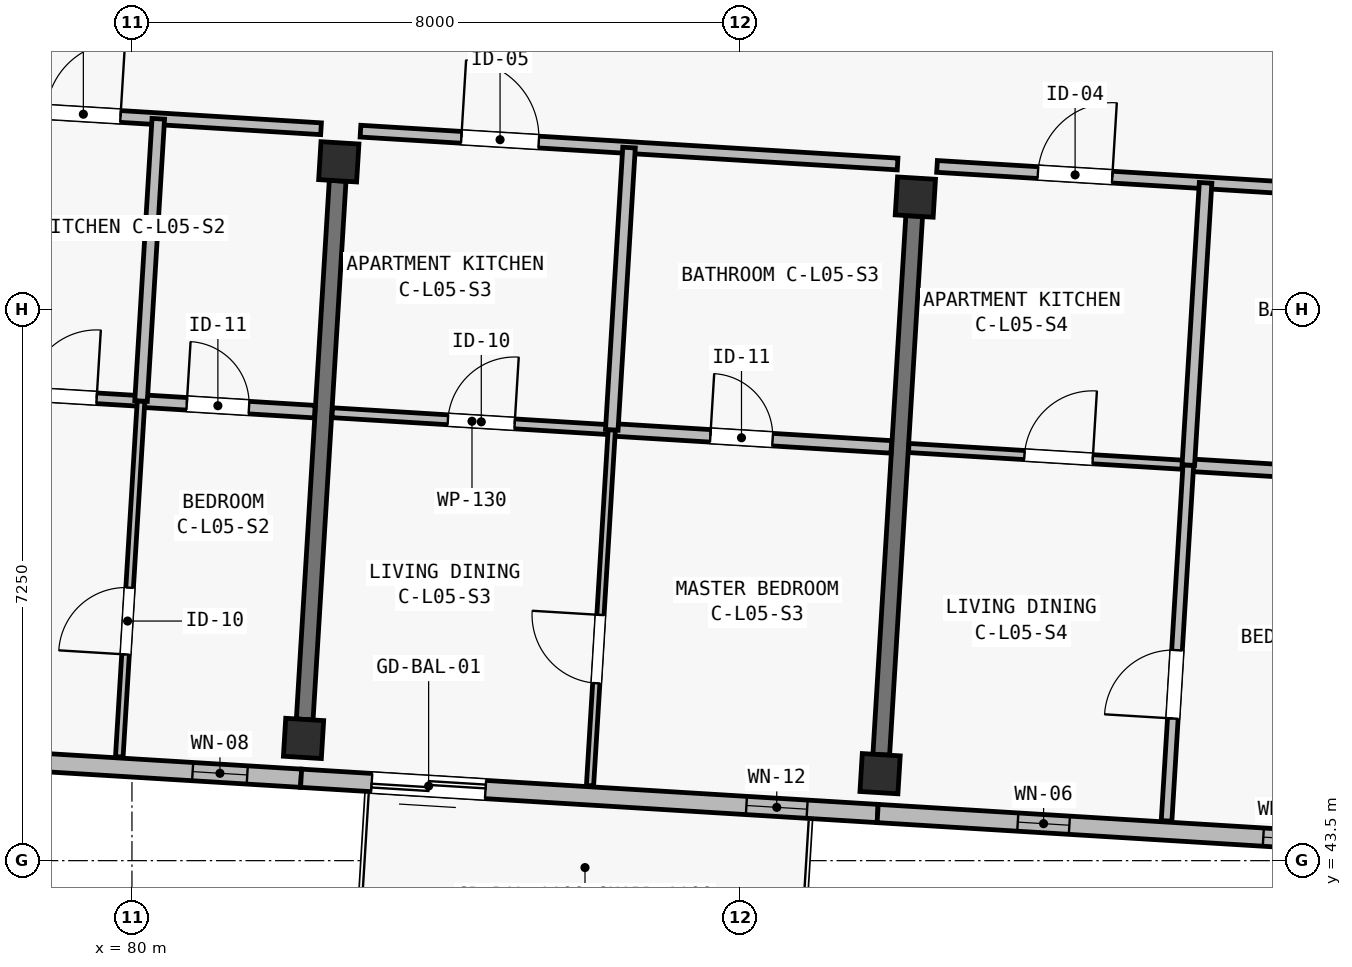
"""IFC4 building model, lengths in metres.
Left out: names, types, materials, properties, quantities, classifications, styles, units other than length and angle.
Written with IfcOpenShell. Run it as: python <this file> out.ifc"""

import sys

from ifc_helpers import new_model, si_unit, direction, frame, frame_2d, origin, origin_2d, place, context, subcontext, project, spatial, rectangle, extrude, element, fill, save


model = new_model("IFC4")
c1 = context("Model", 3, precision=1e-05, world=origin(), true_north=direction((0.0, 1.0)))
c2 = subcontext(c1, "Body", "Model", "MODEL_VIEW")
j1 = project(units=[si_unit("LENGTHUNIT", "METRE"), si_unit("PLANEANGLEUNIT", "RADIAN")], contexts=[c1])
p1 = place(None, origin())
s1 = spatial("IfcSite", under=j1, at=p1, CompositionType="ELEMENT")
p2 = place(p1, origin())
s2 = spatial("IfcBuilding", under=s1, at=p2, CompositionType="ELEMENT")
p3 = place(p2, frame((0.0, 0.0, 18.15)))
s3 = spatial("IfcBuildingStorey", under=s2, at=p3, CompositionType="ELEMENT", Elevation=18.15)
for number, where, z_axis, x_axis in (
    (1, (82.258, 45.108, 0.0), (0.0, 0.0, 1.0), (0.998, -0.061, 0.0)),
    (2, (82.721, 52.694, 0.0), (0.0, 0.0, 1.0), (0.998, -0.061, 0.0)),
    (3, (89.843, 44.644, 0.0), (0.0, 0.0, 1.0), (0.998, -0.061, 0.0)),
    (4, (90.307, 52.23, 0.0), (0.0, 0.0, 1.0), (0.998, -0.061, 0.0)),
):
    element("IfcColumn", number, at=place(p3, frame(where, z_axis=z_axis, x_axis=x_axis)), inside=s3, PredefinedType="COLUMN", context=c2, shape_type="SweptSolid", body=[
        extrude(rectangle(XDim=0.5, YDim=0.5, at=origin_2d()), origin(), (0.0, 0.0, 1.0), 3.25),
    ])
p4 = place(p3, frame((82.273, 45.358, 0.0), z_axis=(0.0, 0.0, 1.0), x_axis=(0.061070212127, 0.998133472633, 0.0)))
e5 = element("IfcWall", 5, at=p4, inside=s3, PredefinedType="SHEAR", context=c2, shape_type="SweptSolid", body=[
    extrude(rectangle(XDim=7.1, YDim=0.22, at=frame_2d((3.55, 0.0))), origin(), (0.0, 0.0, 1.0), 2.5),
])
p5 = place(p3, frame((89.859, 44.894, 0.0), z_axis=(0.0, 0.0, 1.0), x_axis=(0.061033859059, 0.99813569621, 0.0)))
e6 = element("IfcWall", 6, at=p5, inside=s3, PredefinedType="SHEAR", context=c2, shape_type="SweptSolid", body=[
    extrude(rectangle(XDim=7.1, YDim=0.22, at=frame_2d((3.55, 0.0))), origin(), (0.0, 0.0, 1.0), 2.5),
])
p6 = place(p3, frame((82.225, 44.584, 0.0), z_axis=(0.0, 0.0, 1.0), x_axis=(-0.998133591969, 0.061068261669, 0.0)))
e7 = element("IfcWall", 7, at=p6, inside=s3, PredefinedType="SOLIDWALL", context=c2, shape_type="SweptSolid", body=[
    extrude(rectangle(XDim=7.6, YDim=0.24, at=frame_2d((3.8, 0.0))), origin(), (0.0, 0.0, 1.0), 3.0),
])
p7 = place(p6, frame((0.71, 0.0, 0.48)))
e8 = element("IfcOpeningElement", 8, at=p7, cuts=e7, PredefinedType="OPENING", context=c2, shape_type="SweptSolid", body=[
    extrude(rectangle(XDim=0.72, YDim=2.16, at=frame_2d((0.36, 1.08))), frame((0.0, 0.135, 0.0), z_axis=(0.0, -1.0, 0.0), x_axis=(1.0, 0.0, 0.0)), (0.0, 0.0, 1.0), 0.27),
])
p8 = place(p6, frame((3.504, 0.0, 0.48)))
e9 = element("IfcOpeningElement", 9, at=p8, cuts=e7, PredefinedType="OPENING", context=c2, shape_type="SweptSolid", body=[
    extrude(rectangle(XDim=0.78, YDim=2.2, at=frame_2d((0.39, 1.1))), frame((0.0, 0.135, 0.0), z_axis=(0.0, -1.0, 0.0), x_axis=(1.0, 0.0, 0.0)), (0.0, 0.0, 1.0), 0.27),
])
p9 = place(p3, frame((89.811, 44.12, 0.0), z_axis=(0.0, 0.0, 1.0), x_axis=(-0.998135669243, 0.061034300063, 0.0)))
e10 = element("IfcWall", 10, at=p9, inside=s3, PredefinedType="SOLIDWALL", context=c2, shape_type="SweptSolid", body=[
    extrude(rectangle(XDim=7.6, YDim=0.24, at=frame_2d((3.8, 0.0))), origin(), (0.0, 0.0, 1.0), 3.0),
])
p10 = place(p9, frame((5.169, 0.0, 0.0)))
e11 = element("IfcOpeningElement", 11, at=p10, cuts=e10, PredefinedType="OPENING", context=c2, shape_type="SweptSolid", body=[
    extrude(rectangle(XDim=1.5, YDim=2.12, at=frame_2d((0.75, 1.06))), frame((0.0, 0.135, 0.0), z_axis=(0.0, -1.0, 0.0), x_axis=(1.0, 0.0, 0.0)), (0.0, 0.0, 1.0), 0.27),
])
p11 = place(p9, frame((0.93, 0.0, 0.5)))
e12 = element("IfcOpeningElement", 12, at=p11, cuts=e10, PredefinedType="OPENING", context=c2, shape_type="SweptSolid", body=[
    extrude(rectangle(XDim=0.8, YDim=2.3, at=frame_2d((0.4, 1.15))), frame((0.0, 0.135, 0.0), z_axis=(0.0, -1.0, 0.0), x_axis=(1.0, 0.0, 0.0)), (0.0, 0.0, 1.0), 0.27),
])
p12 = place(p3, frame((97.397, 43.656, 0.0), z_axis=(0.0, 0.0, 1.0), x_axis=(-0.998135549572, 0.061036257095, 0.0)))
e13 = element("IfcWall", 13, at=p12, inside=s3, PredefinedType="SOLIDWALL", context=c2, shape_type="SweptSolid", body=[
    extrude(rectangle(XDim=7.6, YDim=0.24, at=frame_2d((3.8, 0.0))), origin(), (0.0, 0.0, 1.0), 3.0),
])
p13 = place(p12, frame((1.896, 0.0, 0.42)))
e14 = element("IfcOpeningElement", 14, at=p13, cuts=e13, PredefinedType="OPENING", context=c2, shape_type="SweptSolid", body=[
    extrude(rectangle(XDim=0.62, YDim=2.28, at=frame_2d((0.31, 1.14))), frame((0.0, 0.135, 0.0), z_axis=(0.0, -1.0, 0.0), x_axis=(1.0, 0.0, 0.0)), (0.0, 0.0, 1.0), 0.27),
])
p14 = place(p12, frame((5.073, 0.0, 0.42)))
e15 = element("IfcOpeningElement", 15, at=p14, cuts=e13, PredefinedType="OPENING", context=c2, shape_type="SweptSolid", body=[
    extrude(rectangle(XDim=0.68, YDim=2.24, at=frame_2d((0.34, 1.12))), frame((0.0, 0.135, 0.0), z_axis=(0.0, -1.0, 0.0), x_axis=(1.0, 0.0, 0.0)), (0.0, 0.0, 1.0), 0.27),
])
p15 = place(p3, frame((78.415, 53.378, 0.0), z_axis=(0.0, 0.0, 1.0), x_axis=(0.998131852862, -0.061096679962, 0.0)))
e16 = element("IfcWall", 16, at=p15, inside=s3, PredefinedType="PARTITIONING", context=c2, shape_type="SweptSolid", body=[
    extrude(rectangle(XDim=4.08, YDim=0.155, at=frame_2d((2.04, 0.0))), origin(), (0.0, 0.0, 1.0), 2.97),
])
p16 = place(p15, frame((0.457, 0.0, 0.0)))
e17 = element("IfcOpeningElement", 17, at=p16, cuts=e16, PredefinedType="OPENING", context=c2, shape_type="SweptSolid", body=[
    extrude(rectangle(XDim=0.98, YDim=2.15, at=frame_2d((0.49, 1.075))), frame((0.0, 0.093, 0.0), z_axis=(0.0, -1.0, 0.0), x_axis=(1.0, 0.0, 0.0)), (0.0, 0.0, 1.0), 0.185),
])
p17 = place(p3, frame((75.049, 49.857, 0.0), z_axis=(0.0, 0.0, 1.0), x_axis=(0.998135637207, -0.061034823981, 0.0)))
e18 = element("IfcWall", 18, at=p17, inside=s3, PredefinedType="PARTITIONING", context=c2, shape_type="SweptSolid", body=[
    extrude(rectangle(XDim=5.08, YDim=0.14, at=frame_2d((2.54, 0.0))), origin(), (0.0, 0.0, 1.0), 2.97),
])
p18 = place(p17, frame((3.595, 0.0, 0.0)))
e19 = element("IfcOpeningElement", 19, at=p18, cuts=e18, PredefinedType="OPENING", context=c2, shape_type="SweptSolid", body=[
    extrude(rectangle(XDim=0.9, YDim=2.1, at=frame_2d((0.45, 1.05))), frame((0.0, 0.085, 0.0), z_axis=(0.0, -1.0, 0.0), x_axis=(1.0, 0.0, 0.0)), (0.0, 0.0, 1.0), 0.17),
])
p19 = place(p3, frame((80.119, 49.547, 0.0), z_axis=(0.0, 0.0, 1.0), x_axis=(0.99813262565, -0.061084053668, 0.0)))
e20 = element("IfcWall", 20, at=p19, inside=s3, PredefinedType="PLUMBINGWALL", context=c2, shape_type="SweptSolid", body=[
    extrude(rectangle(XDim=2.29, YDim=0.165, at=frame_2d((1.145, 0.0))), origin(), (0.0, 0.0, 1.0), 2.97),
])
p20 = place(p19, frame((0.603, 0.0, 0.0)))
e21 = element("IfcOpeningElement", 21, at=p20, cuts=e20, PredefinedType="OPENING", context=c2, shape_type="SweptSolid", body=[
    extrude(rectangle(XDim=0.82, YDim=2.08, at=frame_2d((0.41, 1.04))), frame((0.0, 0.097, 0.0), z_axis=(0.0, -1.0, 0.0), x_axis=(1.0, 0.0, 0.0)), (0.0, 0.0, 1.0), 0.195),
])
p21 = place(p3, frame((79.833, 44.866, 0.0), z_axis=(0.0, 0.0, 1.0), x_axis=(0.061010571843, 0.998137119901, 0.0)))
e22 = element("IfcWall", 22, at=p21, inside=s3, PredefinedType="PARTITIONING", context=c2, shape_type="SweptSolid", body=[
    extrude(rectangle(XDim=4.69, YDim=0.1, at=frame_2d((2.345, 0.0))), origin(), (0.0, 0.0, 1.0), 2.97),
])
p22 = place(p21, frame((1.35, 0.0, 0.0)))
e23 = element("IfcOpeningElement", 23, at=p22, cuts=e22, PredefinedType="OPENING", context=c2, shape_type="SweptSolid", body=[
    extrude(rectangle(XDim=0.88, YDim=2.1, at=frame_2d((0.44, 1.05))), frame((0.0, 0.065, 0.0), z_axis=(0.0, -1.0, 0.0), x_axis=(1.0, 0.0, 0.0)), (0.0, 0.0, 1.0), 0.13),
])
p23 = place(p3, frame((80.119, 49.547, 0.0), z_axis=(0.0, 0.0, 1.0), x_axis=(0.061099388563, 0.998131687062, 0.0)))
e24 = element("IfcWall", 24, at=p23, inside=s3, PredefinedType="PLUMBINGWALL", context=c2, shape_type="SweptSolid", body=[
    extrude(rectangle(XDim=3.72, YDim=0.165, at=frame_2d((1.86, 0.0))), origin(), (0.0, 0.0, 1.0), 2.97),
])
p24 = place(p3, frame((83.007, 53.097, 0.0), z_axis=(0.0, 0.0, 1.0), x_axis=(0.998135666539, -0.061034344288, 0.0)))
e25 = element("IfcWall", 25, at=p24, inside=s3, PredefinedType="PARTITIONING", context=c2, shape_type="SweptSolid", body=[
    extrude(rectangle(XDim=7.08, YDim=0.155, at=frame_2d((3.54, 0.0))), origin(), (0.0, 0.0, 1.0), 2.97),
])
p25 = place(p24, frame((1.33, 0.0, 0.0)))
e26 = element("IfcOpeningElement", 26, at=p25, cuts=e25, PredefinedType="OPENING", context=c2, shape_type="SweptSolid", body=[
    extrude(rectangle(XDim=1.02, YDim=2.2, at=frame_2d((0.51, 1.1))), frame((0.0, 0.093, 0.0), z_axis=(0.0, -1.0, 0.0), x_axis=(1.0, 0.0, 0.0)), (0.0, 0.0, 1.0), 0.185),
])
p26 = place(p3, frame((82.635, 49.393, 0.0), z_axis=(0.0, 0.0, 1.0), x_axis=(0.998132682596, -0.061083123148, 0.0)))
e27 = element("IfcWall", 27, at=p26, inside=s3, PredefinedType="PARTITIONING", context=c2, shape_type="SweptSolid", body=[
    extrude(rectangle(XDim=3.685, YDim=0.13, at=frame_2d((1.843, 0.0))), origin(), (0.0, 0.0, 1.0), 2.97),
])
p27 = place(p26, frame((1.525, 0.0, 0.0)))
e28 = element("IfcOpeningElement", 28, at=p27, cuts=e27, PredefinedType="OPENING", context=c2, shape_type="SweptSolid", body=[
    extrude(rectangle(XDim=0.88, YDim=2.1, at=frame_2d((0.44, 1.05))), frame((0.0, 0.08, 0.0), z_axis=(0.0, -1.0, 0.0), x_axis=(1.0, 0.0, 0.0)), (0.0, 0.0, 1.0), 0.16),
])
p28 = place(p3, frame((86.313, 49.168, 0.0), z_axis=(0.0, 0.0, 1.0), x_axis=(0.998136472989, -0.061021154439, 0.0)))
e29 = element("IfcWall", 29, at=p28, inside=s3, PredefinedType="PLUMBINGWALL", context=c2, shape_type="SweptSolid", body=[
    extrude(rectangle(XDim=3.685, YDim=0.165, at=frame_2d((1.842, 0.0))), origin(), (0.0, 0.0, 1.0), 2.97),
])
p29 = place(p28, frame((1.3, 0.0, 0.0)))
e30 = element("IfcOpeningElement", 30, at=p29, cuts=e29, PredefinedType="OPENING", context=c2, shape_type="SweptSolid", body=[
    extrude(rectangle(XDim=0.82, YDim=2.08, at=frame_2d((0.41, 1.04))), frame((0.0, 0.097, 0.0), z_axis=(0.0, -1.0, 0.0), x_axis=(1.0, 0.0, 0.0)), (0.0, 0.0, 1.0), 0.195),
])
p30 = place(p3, frame((86.027, 44.487, 0.0), z_axis=(0.0, 0.0, 1.0), x_axis=(0.061062434628, 0.998133948465, 0.0)))
e31 = element("IfcWall", 31, at=p30, inside=s3, PredefinedType="PARTITIONING", context=c2, shape_type="SweptSolid", body=[
    extrude(rectangle(XDim=4.69, YDim=0.095, at=frame_2d((2.345, 0.0))), origin(), (0.0, 0.0, 1.0), 2.97),
])
p31 = place(p30, frame((1.35, 0.0, 0.0)))
e32 = element("IfcOpeningElement", 32, at=p31, cuts=e31, PredefinedType="OPENING", context=c2, shape_type="SweptSolid", body=[
    extrude(rectangle(XDim=0.9, YDim=2.1, at=frame_2d((0.45, 1.05))), frame((0.0, 0.062, 0.0), z_axis=(0.0, -1.0, 0.0), x_axis=(1.0, 0.0, 0.0)), (0.0, 0.0, 1.0), 0.125),
])
p32 = place(p3, frame((86.313, 49.168, 0.0), z_axis=(0.0, 0.0, 1.0), x_axis=(0.061034005467, 0.998135687257, 0.0)))
e33 = element("IfcWall", 33, at=p32, inside=s3, PredefinedType="PLUMBINGWALL", context=c2, shape_type="SweptSolid", body=[
    extrude(rectangle(XDim=3.72, YDim=0.165, at=frame_2d((1.86, 0.0))), origin(), (0.0, 0.0, 1.0), 2.97),
])
p33 = place(p3, frame((90.593, 52.633, 0.0), z_axis=(0.0, 0.0, 1.0), x_axis=(0.998135538078, -0.061036445065, 0.0)))
e34 = element("IfcWall", 34, at=p33, inside=s3, PredefinedType="PARTITIONING", context=c2, shape_type="SweptSolid", body=[
    extrude(rectangle(XDim=7.08, YDim=0.155, at=frame_2d((3.54, 0.0))), origin(), (0.0, 0.0, 1.0), 2.97),
])
p34 = place(p33, frame((1.33, 0.0, 0.0)))
e35 = element("IfcOpeningElement", 35, at=p34, cuts=e34, PredefinedType="OPENING", context=c2, shape_type="SweptSolid", body=[
    extrude(rectangle(XDim=0.98, YDim=2.15, at=frame_2d((0.49, 1.075))), frame((0.0, 0.093, 0.0), z_axis=(0.0, -1.0, 0.0), x_axis=(1.0, 0.0, 0.0)), (0.0, 0.0, 1.0), 0.185),
])
p35 = place(p3, frame((90.221, 48.929, 0.0), z_axis=(0.0, 0.0, 1.0), x_axis=(0.99813243538, -0.061087162657, 0.0)))
e36 = element("IfcWall", 36, at=p35, inside=s3, PredefinedType="PARTITIONING", context=c2, shape_type="SweptSolid", body=[
    extrude(rectangle(XDim=3.685, YDim=0.12, at=frame_2d((1.842, 0.0))), origin(), (0.0, 0.0, 1.0), 2.97),
])
p36 = place(p35, frame((1.525, 0.0, 0.0)))
e37 = element("IfcOpeningElement", 37, at=p36, cuts=e36, PredefinedType="OPENING", context=c2, shape_type="SweptSolid", body=[
    extrude(rectangle(XDim=0.9, YDim=2.1, at=frame_2d((0.45, 1.05))), frame((0.0, 0.075, 0.0), z_axis=(0.0, -1.0, 0.0), x_axis=(1.0, 0.0, 0.0)), (0.0, 0.0, 1.0), 0.15),
])
p37 = place(p3, frame((93.899, 48.704, 0.0), z_axis=(0.0, 0.0, 1.0), x_axis=(0.998136719672, -0.061017119263, 0.0)))
e38 = element("IfcWall", 38, at=p37, inside=s3, PredefinedType="PLUMBINGWALL", context=c2, shape_type="SweptSolid", body=[
    extrude(rectangle(XDim=3.685, YDim=0.165, at=frame_2d((1.843, 0.0))), origin(), (0.0, 0.0, 1.0), 2.97),
])
p38 = place(p37, frame((1.3, 0.0, 0.0)))
e39 = element("IfcOpeningElement", 39, at=p38, cuts=e38, PredefinedType="OPENING", context=c2, shape_type="SweptSolid", body=[
    extrude(rectangle(XDim=0.82, YDim=2.08, at=frame_2d((0.41, 1.04))), frame((0.0, 0.097, 0.0), z_axis=(0.0, -1.0, 0.0), x_axis=(1.0, 0.0, 0.0)), (0.0, 0.0, 1.0), 0.195),
])
p39 = place(p3, frame((93.612, 44.023, 0.0), z_axis=(0.0, 0.0, 1.0), x_axis=(0.061062434628, 0.998133948465, 0.0)))
e40 = element("IfcWall", 40, at=p39, inside=s3, PredefinedType="PARTITIONING", context=c2, shape_type="SweptSolid", body=[
    extrude(rectangle(XDim=4.69, YDim=0.14, at=frame_2d((2.345, 0.0))), origin(), (0.0, 0.0, 1.0), 2.97),
])
p40 = place(p39, frame((1.35, 0.0, 0.0)))
e41 = element("IfcOpeningElement", 41, at=p40, cuts=e40, PredefinedType="OPENING", context=c2, shape_type="SweptSolid", body=[
    extrude(rectangle(XDim=0.9, YDim=2.1, at=frame_2d((0.45, 1.05))), frame((0.0, 0.085, 0.0), z_axis=(0.0, -1.0, 0.0), x_axis=(1.0, 0.0, 0.0)), (0.0, 0.0, 1.0), 0.17),
])
p41 = place(p3, frame((93.899, 48.704, 0.0), z_axis=(0.0, 0.0, 1.0), x_axis=(0.061034005467, 0.998135687257, 0.0)))
e42 = element("IfcWall", 42, at=p41, inside=s3, PredefinedType="PLUMBINGWALL", context=c2, shape_type="SweptSolid", body=[
    extrude(rectangle(XDim=3.72, YDim=0.165, at=frame_2d((1.86, 0.0))), origin(), (0.0, 0.0, 1.0), 2.97),
])
p42 = place(p7, origin())
e43 = element("IfcWindow", 43, at=p42, inside=s3, PartitioningType="SINGLE_PANEL", PredefinedType="WINDOW", context=c2, shape_type="SweptSolid", body=[
    extrude(rectangle(XDim=0.72, YDim=2.16, at=frame_2d((0.36, 1.08))), frame((0.0, 0.03, 0.0), z_axis=(0.0, -1.0, 0.0), x_axis=(1.0, 0.0, 0.0)), (0.0, 0.0, 1.0), 0.06),
])
fill(e8, e43)
p43 = place(p10, origin())
e44 = element("IfcDoor", 44, at=p43, inside=s3, OperationType="SLIDING_TO_RIGHT", PredefinedType="DOOR", context=c2, shape_type="SweptSolid", body=[
    extrude(rectangle(XDim=1.5, YDim=2.12, at=frame_2d((0.75, 1.06))), frame((0.0, 0.025, 0.0), z_axis=(0.0, -1.0, 0.0), x_axis=(1.0, 0.0, 0.0)), (0.0, 0.0, 1.0), 0.05),
])
fill(e11, e44)
p44 = place(p11, origin())
e45 = element("IfcWindow", 45, at=p44, inside=s3, PartitioningType="SINGLE_PANEL", PredefinedType="WINDOW", context=c2, shape_type="SweptSolid", body=[
    extrude(rectangle(XDim=0.8, YDim=2.3, at=frame_2d((0.4, 1.15))), frame((0.0, 0.03, 0.0), z_axis=(0.0, -1.0, 0.0), x_axis=(1.0, 0.0, 0.0)), (0.0, 0.0, 1.0), 0.06),
])
fill(e12, e45)
p45 = place(p13, origin())
e46 = element("IfcWindow", 46, at=p45, inside=s3, PartitioningType="SINGLE_PANEL", PredefinedType="WINDOW", context=c2, shape_type="SweptSolid", body=[
    extrude(rectangle(XDim=0.62, YDim=2.28, at=frame_2d((0.31, 1.14))), frame((0.0, 0.03, 0.0), z_axis=(0.0, -1.0, 0.0), x_axis=(1.0, 0.0, 0.0)), (0.0, 0.0, 1.0), 0.06),
])
fill(e14, e46)
p46 = place(p14, origin())
e47 = element("IfcWindow", 47, at=p46, inside=s3, PartitioningType="SINGLE_PANEL", PredefinedType="WINDOW", context=c2, shape_type="SweptSolid", body=[
    extrude(rectangle(XDim=0.68, YDim=2.24, at=frame_2d((0.34, 1.12))), frame((0.0, 0.03, 0.0), z_axis=(0.0, -1.0, 0.0), x_axis=(1.0, 0.0, 0.0)), (0.0, 0.0, 1.0), 0.06),
])
fill(e15, e47)
p47 = place(p16, origin())
e48 = element("IfcDoor", 48, at=p47, inside=s3, OperationType="SINGLE_SWING_RIGHT", PredefinedType="DOOR", context=c2, shape_type="SweptSolid", body=[
    extrude(rectangle(XDim=0.98, YDim=2.15, at=frame_2d((0.49, 1.075))), frame((0.0, 0.025, 0.0), z_axis=(0.0, -1.0, 0.0), x_axis=(1.0, 0.0, 0.0)), (0.0, 0.0, 1.0), 0.05),
])
fill(e17, e48)
p48 = place(p18, origin())
e49 = element("IfcDoor", 49, at=p48, inside=s3, OperationType="SINGLE_SWING_RIGHT", PredefinedType="DOOR", context=c2, shape_type="SweptSolid", body=[
    extrude(rectangle(XDim=0.9, YDim=2.1, at=frame_2d((0.45, 1.05))), frame((0.0, 0.025, 0.0), z_axis=(0.0, -1.0, 0.0), x_axis=(1.0, 0.0, 0.0)), (0.0, 0.0, 1.0), 0.05),
])
fill(e19, e49)
p49 = place(p20, origin())
e50 = element("IfcDoor", 50, at=p49, inside=s3, OperationType="SINGLE_SWING_LEFT", PredefinedType="DOOR", context=c2, shape_type="SweptSolid", body=[
    extrude(rectangle(XDim=0.82, YDim=2.08, at=frame_2d((0.41, 1.04))), frame((0.0, 0.025, 0.0), z_axis=(0.0, -1.0, 0.0), x_axis=(1.0, 0.0, 0.0)), (0.0, 0.0, 1.0), 0.05),
])
fill(e21, e50)
p50 = place(p22, origin())
e51 = element("IfcDoor", 51, at=p50, inside=s3, OperationType="SINGLE_SWING_LEFT", PredefinedType="DOOR", context=c2, shape_type="SweptSolid", body=[
    extrude(rectangle(XDim=0.88, YDim=2.1, at=frame_2d((0.44, 1.05))), frame((0.0, 0.025, 0.0), z_axis=(0.0, -1.0, 0.0), x_axis=(1.0, 0.0, 0.0)), (0.0, 0.0, 1.0), 0.05),
])
fill(e23, e51)
p51 = place(p25, origin())
e52 = element("IfcDoor", 52, at=p51, inside=s3, OperationType="SINGLE_SWING_LEFT", PredefinedType="DOOR", context=c2, shape_type="SweptSolid", body=[
    extrude(rectangle(XDim=1.02, YDim=2.2, at=frame_2d((0.51, 1.1))), frame((0.0, 0.025, 0.0), z_axis=(0.0, -1.0, 0.0), x_axis=(1.0, 0.0, 0.0)), (0.0, 0.0, 1.0), 0.05),
])
fill(e26, e52)
p52 = place(p27, origin())
e53 = element("IfcDoor", 53, at=p52, inside=s3, OperationType="SINGLE_SWING_RIGHT", PredefinedType="DOOR", context=c2, shape_type="SweptSolid", body=[
    extrude(rectangle(XDim=0.88, YDim=2.1, at=frame_2d((0.44, 1.05))), frame((0.0, 0.025, 0.0), z_axis=(0.0, -1.0, 0.0), x_axis=(1.0, 0.0, 0.0)), (0.0, 0.0, 1.0), 0.05),
])
fill(e28, e53)
p53 = place(p29, origin())
e54 = element("IfcDoor", 54, at=p53, inside=s3, OperationType="SINGLE_SWING_LEFT", PredefinedType="DOOR", context=c2, shape_type="SweptSolid", body=[
    extrude(rectangle(XDim=0.82, YDim=2.08, at=frame_2d((0.41, 1.04))), frame((0.0, 0.025, 0.0), z_axis=(0.0, -1.0, 0.0), x_axis=(1.0, 0.0, 0.0)), (0.0, 0.0, 1.0), 0.05),
])
fill(e30, e54)
p54 = place(p31, origin())
e55 = element("IfcDoor", 55, at=p54, inside=s3, OperationType="SINGLE_SWING_RIGHT", PredefinedType="DOOR", context=c2, shape_type="SweptSolid", body=[
    extrude(rectangle(XDim=0.9, YDim=2.1, at=frame_2d((0.45, 1.05))), frame((0.0, 0.025, 0.0), z_axis=(0.0, -1.0, 0.0), x_axis=(1.0, 0.0, 0.0)), (0.0, 0.0, 1.0), 0.05),
])
fill(e32, e55)
p55 = place(p34, origin())
e56 = element("IfcDoor", 56, at=p55, inside=s3, OperationType="SINGLE_SWING_RIGHT", PredefinedType="DOOR", context=c2, shape_type="SweptSolid", body=[
    extrude(rectangle(XDim=0.98, YDim=2.15, at=frame_2d((0.49, 1.075))), frame((0.0, 0.025, 0.0), z_axis=(0.0, -1.0, 0.0), x_axis=(1.0, 0.0, 0.0)), (0.0, 0.0, 1.0), 0.05),
])
fill(e35, e56)
p56 = place(p36, origin())
e57 = element("IfcDoor", 57, at=p56, inside=s3, OperationType="SINGLE_SWING_RIGHT", PredefinedType="DOOR", context=c2, shape_type="SweptSolid", body=[
    extrude(rectangle(XDim=0.9, YDim=2.1, at=frame_2d((0.45, 1.05))), frame((0.0, 0.025, 0.0), z_axis=(0.0, -1.0, 0.0), x_axis=(1.0, 0.0, 0.0)), (0.0, 0.0, 1.0), 0.05),
])
fill(e37, e57)
p57 = place(p40, origin())
e58 = element("IfcDoor", 58, at=p57, inside=s3, OperationType="SINGLE_SWING_LEFT", PredefinedType="DOOR", context=c2, shape_type="SweptSolid", body=[
    extrude(rectangle(XDim=0.9, YDim=2.1, at=frame_2d((0.45, 1.05))), frame((0.0, 0.025, 0.0), z_axis=(0.0, -1.0, 0.0), x_axis=(1.0, 0.0, 0.0)), (0.0, 0.0, 1.0), 0.05),
])
fill(e41, e58)
save(model, sys.argv[1])
